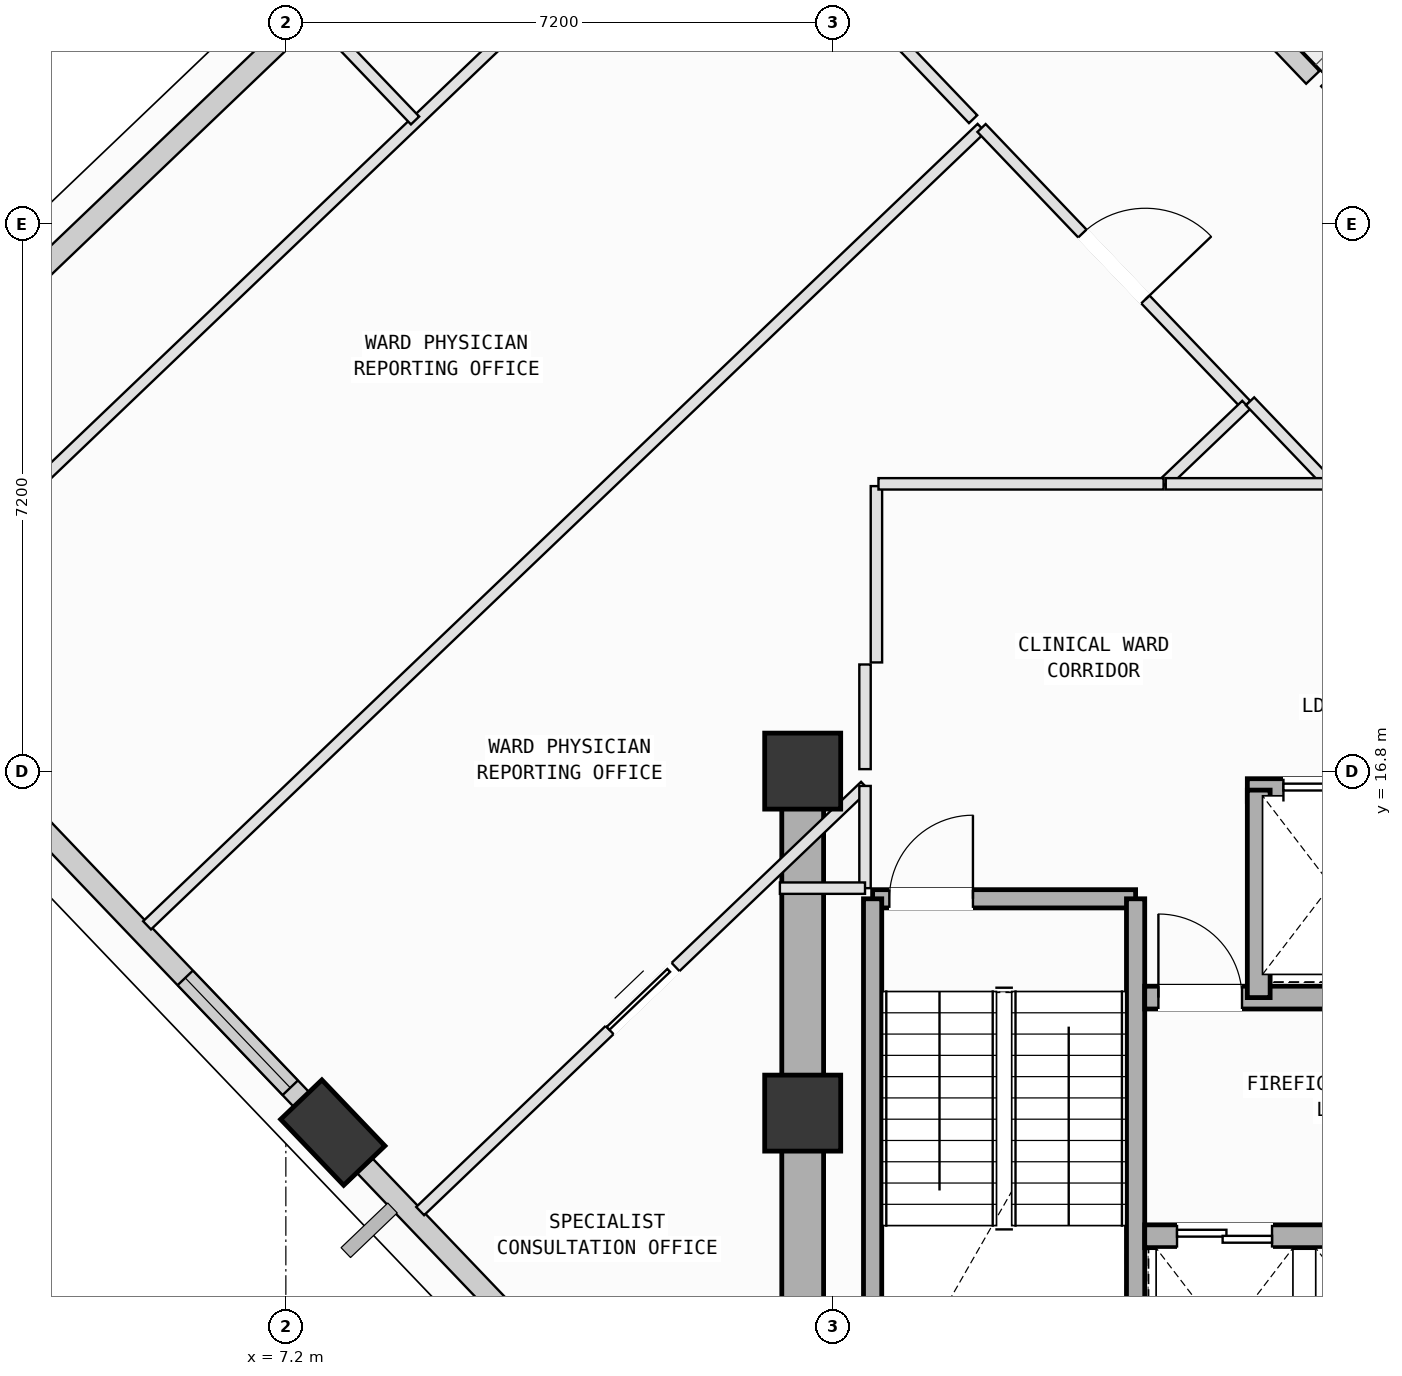
"""IFC4 building model, lengths in metres.
Left out: names, types, materials, properties, quantities, classifications, styles, units other than length and angle.
Written with IfcOpenShell. Run it as: python <this file> out.ifc"""

import sys

from ifc_helpers import new_model, si_unit, direction, frame, frame_2d, origin, origin_2d, place, context, subcontext, project, spatial, rectangle, extrude, element, fill, save


model = new_model("IFC4")
c1 = context("Model", 3, precision=1e-05, world=origin(), true_north=direction((0.0, 1.0)))
c2 = subcontext(c1, "Body", "Model", "MODEL_VIEW")
j1 = project(units=[si_unit("LENGTHUNIT", "METRE"), si_unit("PLANEANGLEUNIT", "RADIAN")], contexts=[c1])
p1 = place(None, origin())
s1 = spatial("IfcSite", under=j1, at=p1, CompositionType="ELEMENT")
p2 = place(p1, origin())
s2 = spatial("IfcBuilding", under=s1, at=p2, CompositionType="ELEMENT")
p3 = place(p2, frame((0.0, 0.0, 211.2)))
s3 = spatial("IfcBuildingStorey", under=s2, at=p3, CompositionType="ELEMENT", Elevation=211.2)
for number, where, z_axis, x_axis in (
    (1, (14.0, 12.3, 0.0), (0.0, 0.0, 1.0), (1.0, 0.0, 0.0)),
    (2, (14.0, 16.8, 0.0), (0.0, 0.0, 1.0), (1.0, 0.0, 0.0)),
):
    element("IfcColumn", number, at=place(p3, frame(where, z_axis=z_axis, x_axis=x_axis)), inside=s3, PredefinedType="COLUMN", context=c2, shape_type="SweptSolid", body=[
        extrude(rectangle(XDim=1.0, YDim=1.0, at=origin_2d()), origin(), (0.0, 0.0, 1.0), 4.0),
    ])
p4 = place(p3, frame((7.817, 12.044, 0.084), z_axis=(0.05339263645, -0.105670345457, 0.992966769063), x_axis=(-0.940385366867, 0.329163998052, 0.085594533524)))
e3 = element("IfcColumn", 3, at=p4, inside=s3, PredefinedType="COLUMN", context=c2, shape_type="SweptSolid", body=[
    extrude(rectangle(XDim=1.2, YDim=0.75, at=origin_2d()), origin(), (0.0, 0.0, 1.0), 3.942),
])
p5 = place(p3, frame((15.902, 30.959, 0.0), z_axis=(0.0, 0.0, 1.0), x_axis=(0.690876921508, -0.722972391816, 0.0)))
e4 = element("IfcWall", 4, at=p5, inside=s3, PredefinedType="SOLIDWALL", context=c2, shape_type="SweptSolid", body=[
    extrude(rectangle(XDim=6.96, YDim=0.24, at=frame_2d((3.48, 0.0))), origin(), (0.0, 0.0, 1.0), 3.265),
])
p6 = place(p5, frame((3.597, 0.0, 0.0)))
e5 = element("IfcOpeningElement", 5, at=p6, cuts=e4, PredefinedType="OPENING", context=c2, shape_type="SweptSolid", body=[
    extrude(rectangle(XDim=1.1, YDim=2.15, at=frame_2d((0.55, 1.075))), frame((0.0, 0.13, 0.0), z_axis=(0.0, -1.0, 0.0), x_axis=(1.0, 0.0, 0.0)), (0.0, 0.0, 1.0), 0.26),
])
p7 = place(p3, frame((20.904, 25.725, 0.0), z_axis=(0.0, 0.0, 1.0), x_axis=(0.722940828191, 0.690909949946, 0.0)))
e6 = element("IfcWall", 6, at=p7, inside=s3, PredefinedType="SOLIDWALL", context=c2, shape_type="SweptSolid", body=[
    extrude(rectangle(XDim=2.5, YDim=0.24, at=frame_2d((1.25, 0.0))), origin(), (0.0, 0.0, 1.0), 3.265),
])
p8 = place(p3, frame((2.617, 22.095, 0.0), z_axis=(0.0, 0.0, 1.0), x_axis=(0.722973311948, 0.690875958629, 0.0)))
e7 = element("IfcWall", 7, at=p8, inside=s3, PredefinedType="SOLIDWALL", context=c2, shape_type="SweptSolid", body=[
    extrude(rectangle(XDim=7.485, YDim=0.28, at=frame_2d((3.742, 0.0))), origin(), (0.0, 0.0, 1.0), 3.265),
])
p9 = place(p3, frame((7.7, 12.171, 0.0), z_axis=(0.0, 0.0, 1.0), x_axis=(-0.690886955568, 0.722962803072, 0.0)))
e8 = element("IfcWall", 8, at=p9, inside=s3, PredefinedType="SOLIDWALL", context=c2, shape_type="SweptSolid", body=[
    extrude(rectangle(XDim=5.83, YDim=0.28, at=frame_2d((2.915, 0.0))), origin(), (0.0, 0.0, 1.0), 3.265),
])
p10 = place(p9, frame((0.64, 0.0, 0.75)))
e9 = element("IfcOpeningElement", 9, at=p10, cuts=e8, PredefinedType="OPENING", context=c2, shape_type="SweptSolid", body=[
    extrude(rectangle(XDim=2.0, YDim=1.95, at=frame_2d((1.0, 0.975))), frame((0.0, 0.15, 0.0), z_axis=(0.0, -1.0, 0.0), x_axis=(1.0, 0.0, 0.0)), (0.0, 0.0, 1.0), 0.3),
])
p11 = place(p3, frame((12.29, 7.368, 0.0), z_axis=(0.0, 0.0, 1.0), x_axis=(-0.690908576556, 0.722942140729, 0.0)))
e10 = element("IfcWall", 10, at=p11, inside=s3, PredefinedType="SOLIDWALL", context=c2, shape_type="SweptSolid", body=[
    extrude(rectangle(XDim=5.861, YDim=0.28, at=frame_2d((2.93, 0.0))), origin(), (0.0, 0.0, 1.0), 3.265),
])
p12 = place(p11, frame((1.66, 0.0, 0.75)))
e11 = element("IfcOpeningElement", 11, at=p12, cuts=e10, PredefinedType="OPENING", context=c2, shape_type="SweptSolid", body=[
    extrude(rectangle(XDim=1.4, YDim=1.85, at=frame_2d((0.7, 0.925))), frame((0.0, 0.15, 0.0), z_axis=(0.0, -1.0, 0.0), x_axis=(1.0, 0.0, 0.0)), (0.0, 0.0, 1.0), 0.3),
])
p13 = place(p3, frame((14.92, 15.12, 0.0), z_axis=(0.0, 0.0, 1.0), x_axis=(1.0, 0.0, 0.0)))
e12 = element("IfcWall", 12, at=p13, inside=s3, PredefinedType="SOLIDWALL", context=c2, shape_type="SweptSolid", body=[
    extrude(rectangle(XDim=3.46, YDim=0.24, at=frame_2d((1.73, 0.0))), origin(), (0.0, 0.0, 1.0), 3.78),
])
p14 = place(p13, frame((0.22, 0.0, 0.0)))
e13 = element("IfcOpeningElement", 13, at=p14, cuts=e12, PredefinedType="OPENING", context=c2, shape_type="SweptSolid", body=[
    extrude(rectangle(XDim=1.1, YDim=2.15, at=frame_2d((0.55, 1.075))), frame((0.0, 0.13, 0.0), z_axis=(0.0, -1.0, 0.0), x_axis=(1.0, 0.0, 0.0)), (0.0, 0.0, 1.0), 0.26),
])
for number, where, z_axis, x_axis in (
    (14, (18.38, 15.12, 0.0), (0.0, 0.0, 1.0), (0.0, -1.0, 0.0)),
    (15, (14.92, 8.075, 0.0), (0.0, 0.0, 1.0), (0.0, 1.0, 0.0)),
):
    element("IfcWall", number, at=place(p3, frame(where, z_axis=z_axis, x_axis=x_axis)), inside=s3, PredefinedType="SOLIDWALL", context=c2, shape_type="SweptSolid", body=[
        extrude(rectangle(XDim=7.045, YDim=0.24, at=frame_2d((3.522, 0.0))), origin(), (0.0, 0.0, 1.0), 3.78),
    ])
p15 = place(p3, frame((14.0, 16.8, 0.0), z_axis=(0.0, 0.0, 1.0), x_axis=(0.0, -1.0, 0.0)))
e16 = element("IfcWall", 16, at=p15, inside=s3, PredefinedType="SHEAR", context=c2, shape_type="SweptSolid", body=[
    extrude(rectangle(XDim=9.0, YDim=0.55, at=frame_2d((4.5, 0.0))), origin(), (0.0, 0.0, 1.0), 3.78),
])
p16 = place(p3, frame((19.85, 16.55, 0.0), z_axis=(0.0, 0.0, 1.0), x_axis=(1.0, 0.0, 0.0)))
e17 = element("IfcWall", 17, at=p16, inside=s3, PredefinedType="SOLIDWALL", context=c2, shape_type="SweptSolid", body=[
    extrude(rectangle(XDim=4.45, YDim=0.3, at=frame_2d((2.225, 0.0))), origin(), (0.0, 0.0, 1.0), 3.78),
])
p17 = place(p16, frame((0.475, 0.0, 0.0)))
e18 = element("IfcOpeningElement", 18, at=p17, cuts=e17, PredefinedType="OPENING", context=c2, shape_type="SweptSolid", body=[
    extrude(rectangle(XDim=1.25, YDim=2.18, at=frame_2d((0.625, 1.09))), frame((0.0, 0.16, 0.0), z_axis=(0.0, -1.0, 0.0), x_axis=(1.0, 0.0, 0.0)), (0.0, 0.0, 1.0), 0.32),
])
p18 = place(p16, frame((2.49, 0.0, 0.0)))
e19 = element("IfcOpeningElement", 19, at=p18, cuts=e17, PredefinedType="OPENING", context=c2, shape_type="SweptSolid", body=[
    extrude(rectangle(XDim=1.02, YDim=2.12, at=frame_2d((0.51, 1.06))), frame((0.0, 0.16, 0.0), z_axis=(0.0, -1.0, 0.0), x_axis=(1.0, 0.0, 0.0)), (0.0, 0.0, 1.0), 0.32),
])
p19 = place(p3, frame((18.5, 10.68, 0.0), z_axis=(0.0, 0.0, 1.0), x_axis=(1.0, 0.0, 0.0)))
e20 = element("IfcWall", 20, at=p19, inside=s3, PredefinedType="SOLIDWALL", context=c2, shape_type="SweptSolid", body=[
    extrude(rectangle(XDim=5.3, YDim=0.3, at=frame_2d((2.65, 0.0))), origin(), (0.0, 0.0, 1.0), 3.78),
])
p20 = place(p19, frame((4.22, 0.0, 0.0)))
e21 = element("IfcOpeningElement", 21, at=p20, cuts=e20, PredefinedType="OPENING", context=c2, shape_type="SweptSolid", body=[
    extrude(rectangle(XDim=0.86, YDim=2.06, at=frame_2d((0.43, 1.03))), frame((0.0, 0.16, 0.0), z_axis=(0.0, -1.0, 0.0), x_axis=(1.0, 0.0, 0.0)), (0.0, 0.0, 1.0), 0.32),
])
p21 = place(p19, frame((0.425, 0.0, 0.0)))
e22 = element("IfcOpeningElement", 22, at=p21, cuts=e20, PredefinedType="OPENING", context=c2, shape_type="SweptSolid", body=[
    extrude(rectangle(XDim=1.25, YDim=2.18, at=frame_2d((0.625, 1.09))), frame((0.0, 0.16, 0.0), z_axis=(0.0, -1.0, 0.0), x_axis=(1.0, 0.0, 0.0)), (0.0, 0.0, 1.0), 0.32),
])
p22 = place(p19, frame((2.525, 0.0, 0.0)))
e23 = element("IfcOpeningElement", 23, at=p22, cuts=e20, PredefinedType="OPENING", context=c2, shape_type="SweptSolid", body=[
    extrude(rectangle(XDim=1.25, YDim=2.18, at=frame_2d((0.625, 1.09))), frame((0.0, 0.16, 0.0), z_axis=(0.0, -1.0, 0.0), x_axis=(1.0, 0.0, 0.0)), (0.0, 0.0, 1.0), 0.32),
])
p23 = place(p3, frame((18.5, 13.82, 0.0), z_axis=(0.0, 0.0, 1.0), x_axis=(1.0, 0.0, 0.0)))
e24 = element("IfcWall", 24, at=p23, inside=s3, PredefinedType="SOLIDWALL", context=c2, shape_type="SweptSolid", body=[
    extrude(rectangle(XDim=5.3, YDim=0.3, at=frame_2d((2.65, 0.0))), origin(), (0.0, 0.0, 1.0), 3.78),
])
p24 = place(p23, frame((0.18, 0.0, 0.0)))
e25 = element("IfcOpeningElement", 25, at=p24, cuts=e24, PredefinedType="OPENING", context=c2, shape_type="SweptSolid", body=[
    extrude(rectangle(XDim=1.1, YDim=2.15, at=frame_2d((0.55, 1.075))), frame((0.0, 0.16, 0.0), z_axis=(0.0, -1.0, 0.0), x_axis=(1.0, 0.0, 0.0)), (0.0, 0.0, 1.0), 0.32),
])
p25 = place(p3, frame((20.0, 13.82, 0.0), z_axis=(0.0, 0.0, 1.0), x_axis=(0.0, 1.0, 0.0)))
e26 = element("IfcWall", 26, at=p25, inside=s3, PredefinedType="SOLIDWALL", context=c2, shape_type="SweptSolid", body=[
    extrude(rectangle(XDim=2.73, YDim=0.3, at=frame_2d((1.365, 0.0))), origin(), (0.0, 0.0, 1.0), 3.78),
])
p26 = place(p3, frame((8.967, 11.011, 0.0), z_axis=(0.0, 0.0, 1.0), x_axis=(0.72292274285, 0.690928873235, 0.0)))
e27 = element("IfcWall", 27, at=p26, inside=s3, PredefinedType="PARTITIONING", context=c2, shape_type="SweptSolid", body=[
    extrude(rectangle(XDim=8.096, YDim=0.15, at=frame_2d((4.048, 0.0))), origin(), (0.0, 0.0, 1.0), 3.78),
])
p27 = place(p26, frame((3.448, 0.0, 0.0)))
e28 = element("IfcOpeningElement", 28, at=p27, cuts=e27, PredefinedType="OPENING", context=c2, shape_type="SweptSolid", body=[
    extrude(rectangle(XDim=1.2, YDim=2.15, at=frame_2d((0.6, 1.075))), frame((0.0, 0.085, 0.0), z_axis=(0.0, -1.0, 0.0), x_axis=(1.0, 0.0, 0.0)), (0.0, 0.0, 1.0), 0.17),
])
p28 = place(p3, frame((14.82, 16.605, 0.0), z_axis=(0.0, 0.0, 1.0), x_axis=(0.0, -1.0, 0.0)))
e29 = element("IfcWall", 29, at=p28, inside=s3, PredefinedType="PARTITIONING", context=c2, shape_type="SweptSolid", body=[
    extrude(rectangle(XDim=1.345, YDim=0.15, at=frame_2d((0.672, 0.0))), origin(), (0.0, 0.0, 1.0), 3.78),
])
p29 = place(p3, frame((14.82, 15.26, 0.0), z_axis=(0.0, 0.0, 1.0), x_axis=(-1.0, 0.0, 0.0)))
e30 = element("IfcWall", 30, at=p29, inside=s3, PredefinedType="PARTITIONING", context=c2, shape_type="SweptSolid", body=[
    extrude(rectangle(XDim=1.12, YDim=0.15, at=frame_2d((0.56, 0.0))), origin(), (0.0, 0.0, 1.0), 3.78),
])
p30 = place(p3, frame((14.97, 20.55, 0.0), z_axis=(0.0, 0.0, 1.0), x_axis=(0.0, -1.0, 0.0)))
e31 = element("IfcWall", 31, at=p30, inside=s3, PredefinedType="PARTITIONING", context=c2, shape_type="SweptSolid", body=[
    extrude(rectangle(XDim=2.32, YDim=0.15, at=frame_2d((1.16, 0.0))), origin(), (0.0, 0.0, 1.0), 3.78),
])
p31 = place(p3, frame((14.82, 18.203, 0.0), z_axis=(0.0, 0.0, 1.0), x_axis=(0.0, -1.0, 0.0)))
e32 = element("IfcWall", 32, at=p31, inside=s3, PredefinedType="PARTITIONING", context=c2, shape_type="SweptSolid", body=[
    extrude(rectangle(XDim=1.377, YDim=0.15, at=frame_2d((0.688, 0.0))), origin(), (0.0, 0.0, 1.0), 3.78),
])
p32 = place(p3, frame((8.075, 11.446, 0.0), z_axis=(0.0, 0.0, 1.0), x_axis=(-0.691024375966, 0.722831454643, 0.0)))
e33 = element("IfcWall", 33, at=p32, inside=s3, PredefinedType="PARTITIONING", context=c2, shape_type="SweptSolid", body=[
    extrude(rectangle(XDim=0.783, YDim=0.15, at=frame_2d((0.392, 0.0))), origin(), (0.0, 0.0, 1.0), 3.265),
])
p33 = place(p3, frame((5.374, 14.771, 0.0), z_axis=(0.0, 0.0, 1.0), x_axis=(0.722993367921, 0.690854970267, 0.0)))
e34 = element("IfcWall", 34, at=p33, inside=s3, PredefinedType="PARTITIONING", context=c2, shape_type="SweptSolid", body=[
    extrude(rectangle(XDim=15.186, YDim=0.15, at=frame_2d((7.593, 0.0))), origin(), (0.0, 0.0, 1.0), 3.78),
])
p34 = place(p3, frame((16.353, 25.262, 0.0), z_axis=(0.0, 0.0, 1.0), x_axis=(0.690842016715, -0.723005745441, 0.0)))
e35 = element("IfcWall", 35, at=p34, inside=s3, PredefinedType="PARTITIONING", context=c2, shape_type="SweptSolid", body=[
    extrude(rectangle(XDim=5.04, YDim=0.15, at=frame_2d((2.52, 0.0))), origin(), (0.0, 0.0, 1.0), 3.78),
])
p35 = place(p34, frame((1.92, 0.0, 0.0)))
e36 = element("IfcOpeningElement", 36, at=p35, cuts=e35, PredefinedType="OPENING", context=c2, shape_type="SweptSolid", body=[
    extrude(rectangle(XDim=1.2, YDim=2.15, at=frame_2d((0.6, 1.075))), frame((0.0, 0.085, 0.0), z_axis=(0.0, -1.0, 0.0), x_axis=(1.0, 0.0, 0.0)), (0.0, 0.0, 1.0), 0.17),
])
p36 = place(p3, frame((19.835, 21.618, 0.0), z_axis=(0.0, 0.0, 1.0), x_axis=(-0.723244890559, -0.690591650891, 0.0)))
e37 = element("IfcWall", 37, at=p36, inside=s3, PredefinedType="PARTITIONING", context=c2, shape_type="SweptSolid", body=[
    extrude(rectangle(XDim=1.503, YDim=0.15, at=frame_2d((0.751, 0.0))), origin(), (0.0, 0.0, 1.0), 3.78),
])
p37 = place(p3, frame((18.748, 20.58, 0.0), z_axis=(0.0, 0.0, 1.0), x_axis=(-1.0, 0.0, 0.0)))
e38 = element("IfcWall", 38, at=p37, inside=s3, PredefinedType="PARTITIONING", context=c2, shape_type="SweptSolid", body=[
    extrude(rectangle(XDim=3.751, YDim=0.15, at=frame_2d((1.875, 0.0))), origin(), (0.0, 0.0, 1.0), 3.78),
])
p38 = place(p3, frame((2.949, 19.646, 0.0), z_axis=(0.0, 0.0, 1.0), x_axis=(0.722954347525, 0.690895803573, 0.0)))
e39 = element("IfcWall", 39, at=p38, inside=s3, PredefinedType="PARTITIONING", context=c2, shape_type="SweptSolid", body=[
    extrude(rectangle(XDim=13.571, YDim=0.15, at=frame_2d((6.785, 0.0))), origin(), (0.0, 0.0, 1.0), 3.78),
])
p39 = place(p3, frame((12.76, 29.022, 0.0), z_axis=(0.0, 0.0, 1.0), x_axis=(0.690842016715, -0.723005745441, 0.0)))
e40 = element("IfcWall", 40, at=p39, inside=s3, PredefinedType="PARTITIONING", context=c2, shape_type="SweptSolid", body=[
    extrude(rectangle(XDim=5.04, YDim=0.15, at=frame_2d((2.52, 0.0))), origin(), (0.0, 0.0, 1.0), 3.78),
])
p40 = place(p39, frame((1.92, 0.0, 0.0)))
e41 = element("IfcOpeningElement", 41, at=p40, cuts=e40, PredefinedType="OPENING", context=c2, shape_type="SweptSolid", body=[
    extrude(rectangle(XDim=1.2, YDim=2.15, at=frame_2d((0.6, 1.075))), frame((0.0, 0.085, 0.0), z_axis=(0.0, -1.0, 0.0), x_axis=(1.0, 0.0, 0.0)), (0.0, 0.0, 1.0), 0.17),
])
p41 = place(p3, frame((8.9, 25.361, 0.0), z_axis=(0.0, 0.0, 1.0), x_axis=(-0.69081517616, 0.723031391011, 0.0)))
e42 = element("IfcWall", 42, at=p41, inside=s3, PredefinedType="PARTITIONING", context=c2, shape_type="SweptSolid", body=[
    extrude(rectangle(XDim=1.864, YDim=0.15, at=frame_2d((0.932, 0.0))), origin(), (0.0, 0.0, 1.0), 2.765),
])
p42 = place(p3, frame((19.886, 21.666, 0.0), z_axis=(0.0, 0.0, 1.0), x_axis=(0.691001224956, -0.722853586219, 0.0)))
e43 = element("IfcWall", 43, at=p42, inside=s3, PredefinedType="PARTITIONING", context=c2, shape_type="SweptSolid", body=[
    extrude(rectangle(XDim=1.502, YDim=0.15, at=frame_2d((0.751, 0.0))), origin(), (0.0, 0.0, 1.0), 3.78),
])
p43 = place(p3, frame((20.924, 20.58, 0.0), z_axis=(0.0, 0.0, 1.0), x_axis=(-1.0, 0.0, 0.0)))
e44 = element("IfcWall", 44, at=p43, inside=s3, PredefinedType="PARTITIONING", context=c2, shape_type="SweptSolid", body=[
    extrude(rectangle(XDim=2.147, YDim=0.15, at=frame_2d((1.073, 0.0))), origin(), (0.0, 0.0, 1.0), 3.78),
])
p44 = place(p10, origin())
e45 = element("IfcWindow", 45, at=p44, inside=s3, PartitioningType="SINGLE_PANEL", PredefinedType="WINDOW", context=c2, shape_type="SweptSolid", body=[
    extrude(rectangle(XDim=2.0, YDim=1.95, at=frame_2d((1.0, 0.975))), frame((0.0, 0.03, 0.0), z_axis=(0.0, -1.0, 0.0), x_axis=(1.0, 0.0, 0.0)), (0.0, 0.0, 1.0), 0.06),
])
fill(e9, e45)
p45 = place(p14, origin())
e46 = element("IfcDoor", 46, at=p45, inside=s3, OperationType="SINGLE_SWING_RIGHT", PredefinedType="DOOR", context=c2, shape_type="SweptSolid", body=[
    extrude(rectangle(XDim=1.1, YDim=2.15, at=frame_2d((0.55, 1.075))), frame((0.0, 0.025, 0.0), z_axis=(0.0, -1.0, 0.0), x_axis=(1.0, 0.0, 0.0)), (0.0, 0.0, 1.0), 0.05),
])
fill(e13, e46)
p46 = place(p24, origin())
e47 = element("IfcDoor", 47, at=p46, inside=s3, OperationType="SINGLE_SWING_LEFT", PredefinedType="DOOR", context=c2, shape_type="SweptSolid", body=[
    extrude(rectangle(XDim=1.1, YDim=2.15, at=frame_2d((0.55, 1.075))), frame((0.0, 0.025, 0.0), z_axis=(0.0, -1.0, 0.0), x_axis=(1.0, 0.0, 0.0)), (0.0, 0.0, 1.0), 0.05),
])
fill(e25, e47)
p47 = place(p21, origin())
e48 = element("IfcDoor", 48, at=p47, inside=s3, OperationType="DOUBLE_DOOR_SLIDING", PredefinedType="DOOR", context=c2, shape_type="SweptSolid", body=[
    extrude(rectangle(XDim=1.25, YDim=2.18, at=frame_2d((0.625, 1.09))), frame((0.0, 0.025, 0.0), z_axis=(0.0, -1.0, 0.0), x_axis=(1.0, 0.0, 0.0)), (0.0, 0.0, 1.0), 0.05),
])
fill(e22, e48)
p48 = place(p17, origin())
e49 = element("IfcDoor", 49, at=p48, inside=s3, OperationType="DOUBLE_DOOR_SLIDING", PredefinedType="DOOR", context=c2, shape_type="SweptSolid", body=[
    extrude(rectangle(XDim=1.25, YDim=2.18, at=frame_2d((0.625, 1.09))), frame((0.0, 0.025, 0.0), z_axis=(0.0, -1.0, 0.0), x_axis=(1.0, 0.0, 0.0)), (0.0, 0.0, 1.0), 0.05),
])
fill(e18, e49)
p49 = place(p35, origin())
e50 = element("IfcDoor", 50, at=p49, inside=s3, OperationType="SINGLE_SWING_RIGHT", PredefinedType="DOOR", context=c2, shape_type="SweptSolid", body=[
    extrude(rectangle(XDim=1.2, YDim=2.15, at=frame_2d((0.6, 1.075))), frame((0.0, 0.025, 0.0), z_axis=(0.0, -1.0, 0.0), x_axis=(1.0, 0.0, 0.0)), (0.0, 0.0, 1.0), 0.05),
])
fill(e36, e50)
p50 = place(p27, origin())
e51 = element("IfcDoor", 51, at=p50, inside=s3, OperationType="SLIDING_TO_LEFT", PredefinedType="DOOR", context=c2, shape_type="SweptSolid", body=[
    extrude(rectangle(XDim=1.2, YDim=2.15, at=frame_2d((0.6, 1.075))), frame((0.0, 0.025, 0.0), z_axis=(0.0, -1.0, 0.0), x_axis=(1.0, 0.0, 0.0)), (0.0, 0.0, 1.0), 0.05),
])
fill(e28, e51)
save(model, sys.argv[1])
